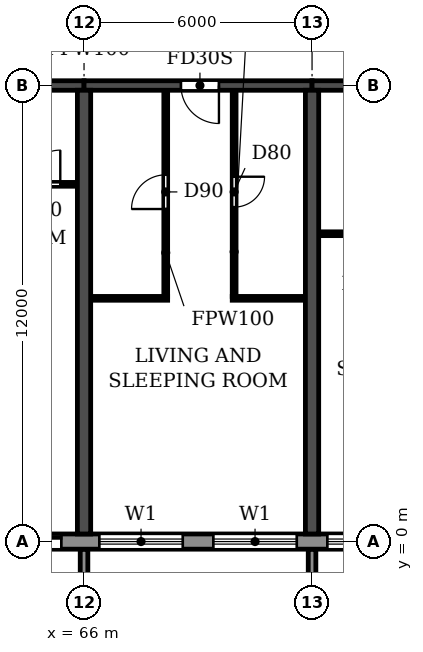
"""IFC4 building model, lengths in metres.
Left out: names, types, materials, properties, quantities, classifications, styles, units other than length and angle.
Written with IfcOpenShell. Run it as: python <this file> out.ifc"""

import sys

from ifc_helpers import new_model, si_unit, direction, frame, frame_2d, origin, place, context, subcontext, project, spatial, polyline, rectangle, outline, extrude, source, transform, mapped, element, fill, save


model = new_model("IFC4")
c1 = context("Model", 3, precision=1e-05, world=origin(), true_north=direction((0.0, 1.0)))
c2 = subcontext(c1, "Body", "Model", "MODEL_VIEW")
j1 = project(units=[si_unit("LENGTHUNIT", "METRE"), si_unit("PLANEANGLEUNIT", "RADIAN")], contexts=[c1])
p1 = place(None, origin())
s1 = spatial("IfcSite", under=j1, at=p1, CompositionType="ELEMENT")
p2 = place(p1, origin())
s2 = spatial("IfcBuilding", under=s1, at=p2, CompositionType="ELEMENT")
p3 = place(p2, frame((0.0, 0.0, 92.7)))
s3 = spatial("IfcBuildingStorey", under=s2, at=p3, CompositionType="ELEMENT", Elevation=92.7)
for number, where, z_axis, x_axis in (
    (1, (66.0, 0.2, 0.0), (0.0, 0.0, 1.0), (0.0, 1.0, 0.0)),
    (2, (72.0, 0.2, 0.0), (0.0, 0.0, 1.0), (0.0, 1.0, 0.0)),
):
    element("IfcWall", number, at=place(p3, frame(where, z_axis=z_axis, x_axis=x_axis)), inside=s3, PredefinedType="SHEAR", context=c2, shape_type="SweptSolid", body=[
        extrude(rectangle(XDim=11.675, YDim=0.35, at=frame_2d((5.837, 0.0))), origin(), (0.0, 0.0, 1.0), 3.06),
    ])
p4 = place(p3, frame((60.0, 12.0, 0.0), z_axis=(0.0, 0.0, 1.0), x_axis=(1.0, 0.0, 0.0)))
e3 = element("IfcWall", 3, at=p4, inside=s3, PredefinedType="SHEAR", context=c2, shape_type="SweptSolid", body=[
    extrude(rectangle(XDim=6.0, YDim=0.25, at=frame_2d((3.0, 0.0))), origin(), (0.0, 0.0, 1.0), 2.46),
])
p5 = place(p4, frame((2.45, 0.0, 0.0)))
e4 = element("IfcOpeningElement", 4, at=p5, cuts=e3, PredefinedType="OPENING", context=c2, shape_type="SweptSolid", body=[
    extrude(rectangle(XDim=1.0, YDim=2.1, at=frame_2d((0.5, 1.05))), frame((0.0, 0.135, 0.0), z_axis=(0.0, -1.0, 0.0), x_axis=(1.0, 0.0, 0.0)), (0.0, 0.0, 1.0), 0.27),
])
p6 = place(p3, frame((66.0, 12.0, 0.0), z_axis=(0.0, 0.0, 1.0), x_axis=(1.0, 0.0, 0.0)))
e5 = element("IfcWall", 5, at=p6, inside=s3, PredefinedType="SHEAR", context=c2, shape_type="SweptSolid", body=[
    extrude(rectangle(XDim=6.0, YDim=0.25, at=frame_2d((3.0, 0.0))), origin(), (0.0, 0.0, 1.0), 2.46),
])
p7 = place(p6, frame((2.55, 0.0, 0.0)))
e6 = element("IfcOpeningElement", 6, at=p7, cuts=e5, PredefinedType="OPENING", context=c2, shape_type="SweptSolid", body=[
    extrude(rectangle(XDim=1.0, YDim=2.1, at=frame_2d((0.5, 1.05))), frame((0.0, 0.135, 0.0), z_axis=(0.0, -1.0, 0.0), x_axis=(1.0, 0.0, 0.0)), (0.0, 0.0, 1.0), 0.27),
])
p8 = place(p3, frame((72.0, 12.0, 0.0), z_axis=(0.0, 0.0, 1.0), x_axis=(1.0, 0.0, 0.0)))
e7 = element("IfcWall", 7, at=p8, inside=s3, PredefinedType="SHEAR", context=c2, shape_type="SweptSolid", body=[
    extrude(rectangle(XDim=6.0, YDim=0.25, at=frame_2d((3.0, 0.0))), origin(), (0.0, 0.0, 1.0), 2.46),
])
p9 = place(p8, frame((2.45, 0.0, 0.0)))
e8 = element("IfcOpeningElement", 8, at=p9, cuts=e7, PredefinedType="OPENING", context=c2, shape_type="SweptSolid", body=[
    extrude(rectangle(XDim=1.0, YDim=2.1, at=frame_2d((0.5, 1.05))), frame((0.0, 0.135, 0.0), z_axis=(0.0, -1.0, 0.0), x_axis=(1.0, 0.0, 0.0)), (0.0, 0.0, 1.0), 0.27),
])
p10 = place(p3, frame((10.683, 0.0, 0.0), z_axis=(0.0, 0.0, 1.0), x_axis=(1.0, 0.0, 0.0)))
e9 = element("IfcWall", 9, at=p10, inside=s3, PredefinedType="STANDARD", context=c2, shape_type="SweptSolid", body=[
    extrude(rectangle(XDim=80.634, YDim=0.4, at=frame_2d((40.317, 0.0))), origin(), (0.0, 0.0, 1.0), 3.06),
])
p11 = place(p10, frame((1.717, 0.0, 0.9)))
e10 = element("IfcOpeningElement", 10, at=p11, cuts=e9, PredefinedType="OPENING", context=c2, shape_type="SweptSolid", body=[
    extrude(rectangle(XDim=2.2, YDim=1.5, at=frame_2d((1.1, 0.75))), frame((0.0, 0.21, 0.0), z_axis=(0.0, -1.0, 0.0), x_axis=(1.0, 0.0, 0.0)), (0.0, 0.0, 1.0), 0.42),
])
p12 = place(p10, frame((4.917, 0.0, 0.0)))
e11 = element("IfcOpeningElement", 11, at=p12, cuts=e9, PredefinedType="OPENING", context=c2, shape_type="SweptSolid", body=[
    extrude(rectangle(XDim=1.8, YDim=2.4, at=frame_2d((0.9, 1.2))), frame((0.0, 0.21, 0.0), z_axis=(0.0, -1.0, 0.0), x_axis=(1.0, 0.0, 0.0)), (0.0, 0.0, 1.0), 0.42),
])
p13 = place(p10, frame((7.717, 0.0, 0.9)))
e12 = element("IfcOpeningElement", 12, at=p13, cuts=e9, PredefinedType="OPENING", context=c2, shape_type="SweptSolid", body=[
    extrude(rectangle(XDim=2.2, YDim=1.5, at=frame_2d((1.1, 0.75))), frame((0.0, 0.21, 0.0), z_axis=(0.0, -1.0, 0.0), x_axis=(1.0, 0.0, 0.0)), (0.0, 0.0, 1.0), 0.42),
])
p14 = place(p10, frame((10.717, 0.0, 0.9)))
e13 = element("IfcOpeningElement", 13, at=p14, cuts=e9, PredefinedType="OPENING", context=c2, shape_type="SweptSolid", body=[
    extrude(rectangle(XDim=2.2, YDim=1.5, at=frame_2d((1.1, 0.75))), frame((0.0, 0.21, 0.0), z_axis=(0.0, -1.0, 0.0), x_axis=(1.0, 0.0, 0.0)), (0.0, 0.0, 1.0), 0.42),
])
p15 = place(p10, frame((13.717, 0.0, 0.9)))
e14 = element("IfcOpeningElement", 14, at=p15, cuts=e9, PredefinedType="OPENING", context=c2, shape_type="SweptSolid", body=[
    extrude(rectangle(XDim=2.2, YDim=1.5, at=frame_2d((1.1, 0.75))), frame((0.0, 0.21, 0.0), z_axis=(0.0, -1.0, 0.0), x_axis=(1.0, 0.0, 0.0)), (0.0, 0.0, 1.0), 0.42),
])
p16 = place(p10, frame((16.717, 0.0, 0.9)))
e15 = element("IfcOpeningElement", 15, at=p16, cuts=e9, PredefinedType="OPENING", context=c2, shape_type="SweptSolid", body=[
    extrude(rectangle(XDim=2.2, YDim=1.5, at=frame_2d((1.1, 0.75))), frame((0.0, 0.21, 0.0), z_axis=(0.0, -1.0, 0.0), x_axis=(1.0, 0.0, 0.0)), (0.0, 0.0, 1.0), 0.42),
])
p17 = place(p10, frame((19.717, 0.0, 0.9)))
e16 = element("IfcOpeningElement", 16, at=p17, cuts=e9, PredefinedType="OPENING", context=c2, shape_type="SweptSolid", body=[
    extrude(rectangle(XDim=2.2, YDim=1.5, at=frame_2d((1.1, 0.75))), frame((0.0, 0.21, 0.0), z_axis=(0.0, -1.0, 0.0), x_axis=(1.0, 0.0, 0.0)), (0.0, 0.0, 1.0), 0.42),
])
p18 = place(p10, frame((22.717, 0.0, 0.9)))
e17 = element("IfcOpeningElement", 17, at=p18, cuts=e9, PredefinedType="OPENING", context=c2, shape_type="SweptSolid", body=[
    extrude(rectangle(XDim=2.2, YDim=1.5, at=frame_2d((1.1, 0.75))), frame((0.0, 0.21, 0.0), z_axis=(0.0, -1.0, 0.0), x_axis=(1.0, 0.0, 0.0)), (0.0, 0.0, 1.0), 0.42),
])
p19 = place(p10, frame((25.717, 0.0, 0.9)))
e18 = element("IfcOpeningElement", 18, at=p19, cuts=e9, PredefinedType="OPENING", context=c2, shape_type="SweptSolid", body=[
    extrude(rectangle(XDim=2.2, YDim=1.5, at=frame_2d((1.1, 0.75))), frame((0.0, 0.21, 0.0), z_axis=(0.0, -1.0, 0.0), x_axis=(1.0, 0.0, 0.0)), (0.0, 0.0, 1.0), 0.42),
])
p20 = place(p10, frame((28.917, 0.0, 0.0)))
e19 = element("IfcOpeningElement", 19, at=p20, cuts=e9, PredefinedType="OPENING", context=c2, shape_type="SweptSolid", body=[
    extrude(rectangle(XDim=1.8, YDim=2.4, at=frame_2d((0.9, 1.2))), frame((0.0, 0.21, 0.0), z_axis=(0.0, -1.0, 0.0), x_axis=(1.0, 0.0, 0.0)), (0.0, 0.0, 1.0), 0.42),
])
p21 = place(p10, frame((31.717, 0.0, 0.9)))
e20 = element("IfcOpeningElement", 20, at=p21, cuts=e9, PredefinedType="OPENING", context=c2, shape_type="SweptSolid", body=[
    extrude(rectangle(XDim=2.2, YDim=1.5, at=frame_2d((1.1, 0.75))), frame((0.0, 0.21, 0.0), z_axis=(0.0, -1.0, 0.0), x_axis=(1.0, 0.0, 0.0)), (0.0, 0.0, 1.0), 0.42),
])
p22 = place(p10, frame((34.717, 0.0, 0.9)))
e21 = element("IfcOpeningElement", 21, at=p22, cuts=e9, PredefinedType="OPENING", context=c2, shape_type="SweptSolid", body=[
    extrude(rectangle(XDim=2.2, YDim=1.5, at=frame_2d((1.1, 0.75))), frame((0.0, 0.21, 0.0), z_axis=(0.0, -1.0, 0.0), x_axis=(1.0, 0.0, 0.0)), (0.0, 0.0, 1.0), 0.42),
])
p23 = place(p10, frame((37.917, 0.0, 0.0)))
e22 = element("IfcOpeningElement", 22, at=p23, cuts=e9, PredefinedType="OPENING", context=c2, shape_type="SweptSolid", body=[
    extrude(rectangle(XDim=1.8, YDim=2.4, at=frame_2d((0.9, 1.2))), frame((0.0, 0.21, 0.0), z_axis=(0.0, -1.0, 0.0), x_axis=(1.0, 0.0, 0.0)), (0.0, 0.0, 1.0), 0.42),
])
p24 = place(p10, frame((40.717, 0.0, 0.9)))
e23 = element("IfcOpeningElement", 23, at=p24, cuts=e9, PredefinedType="OPENING", context=c2, shape_type="SweptSolid", body=[
    extrude(rectangle(XDim=2.2, YDim=1.5, at=frame_2d((1.1, 0.75))), frame((0.0, 0.21, 0.0), z_axis=(0.0, -1.0, 0.0), x_axis=(1.0, 0.0, 0.0)), (0.0, 0.0, 1.0), 0.42),
])
p25 = place(p10, frame((43.717, 0.0, 0.9)))
e24 = element("IfcOpeningElement", 24, at=p25, cuts=e9, PredefinedType="OPENING", context=c2, shape_type="SweptSolid", body=[
    extrude(rectangle(XDim=2.2, YDim=1.5, at=frame_2d((1.1, 0.75))), frame((0.0, 0.21, 0.0), z_axis=(0.0, -1.0, 0.0), x_axis=(1.0, 0.0, 0.0)), (0.0, 0.0, 1.0), 0.42),
])
p26 = place(p10, frame((46.717, 0.0, 0.9)))
e25 = element("IfcOpeningElement", 25, at=p26, cuts=e9, PredefinedType="OPENING", context=c2, shape_type="SweptSolid", body=[
    extrude(rectangle(XDim=2.2, YDim=1.5, at=frame_2d((1.1, 0.75))), frame((0.0, 0.21, 0.0), z_axis=(0.0, -1.0, 0.0), x_axis=(1.0, 0.0, 0.0)), (0.0, 0.0, 1.0), 0.42),
])
p27 = place(p10, frame((49.717, 0.0, 0.9)))
e26 = element("IfcOpeningElement", 26, at=p27, cuts=e9, PredefinedType="OPENING", context=c2, shape_type="SweptSolid", body=[
    extrude(rectangle(XDim=2.2, YDim=1.5, at=frame_2d((1.1, 0.75))), frame((0.0, 0.21, 0.0), z_axis=(0.0, -1.0, 0.0), x_axis=(1.0, 0.0, 0.0)), (0.0, 0.0, 1.0), 0.42),
])
p28 = place(p10, frame((52.917, 0.0, 0.0)))
e27 = element("IfcOpeningElement", 27, at=p28, cuts=e9, PredefinedType="OPENING", context=c2, shape_type="SweptSolid", body=[
    extrude(rectangle(XDim=1.8, YDim=2.4, at=frame_2d((0.9, 1.2))), frame((0.0, 0.21, 0.0), z_axis=(0.0, -1.0, 0.0), x_axis=(1.0, 0.0, 0.0)), (0.0, 0.0, 1.0), 0.42),
])
p29 = place(p10, frame((55.717, 0.0, 0.9)))
e28 = element("IfcOpeningElement", 28, at=p29, cuts=e9, PredefinedType="OPENING", context=c2, shape_type="SweptSolid", body=[
    extrude(rectangle(XDim=2.2, YDim=1.5, at=frame_2d((1.1, 0.75))), frame((0.0, 0.21, 0.0), z_axis=(0.0, -1.0, 0.0), x_axis=(1.0, 0.0, 0.0)), (0.0, 0.0, 1.0), 0.42),
])
p30 = place(p10, frame((58.717, 0.0, 0.9)))
e29 = element("IfcOpeningElement", 29, at=p30, cuts=e9, PredefinedType="OPENING", context=c2, shape_type="SweptSolid", body=[
    extrude(rectangle(XDim=2.2, YDim=1.5, at=frame_2d((1.1, 0.75))), frame((0.0, 0.21, 0.0), z_axis=(0.0, -1.0, 0.0), x_axis=(1.0, 0.0, 0.0)), (0.0, 0.0, 1.0), 0.42),
])
p31 = place(p10, frame((61.717, 0.0, 0.9)))
e30 = element("IfcOpeningElement", 30, at=p31, cuts=e9, PredefinedType="OPENING", context=c2, shape_type="SweptSolid", body=[
    extrude(rectangle(XDim=2.2, YDim=1.5, at=frame_2d((1.1, 0.75))), frame((0.0, 0.21, 0.0), z_axis=(0.0, -1.0, 0.0), x_axis=(1.0, 0.0, 0.0)), (0.0, 0.0, 1.0), 0.42),
])
p32 = place(p10, frame((64.917, 0.0, 0.0)))
e31 = element("IfcOpeningElement", 31, at=p32, cuts=e9, PredefinedType="OPENING", context=c2, shape_type="SweptSolid", body=[
    extrude(rectangle(XDim=1.8, YDim=2.4, at=frame_2d((0.9, 1.2))), frame((0.0, 0.21, 0.0), z_axis=(0.0, -1.0, 0.0), x_axis=(1.0, 0.0, 0.0)), (0.0, 0.0, 1.0), 0.42),
])
p33 = place(p10, frame((67.717, 0.0, 0.9)))
e32 = element("IfcOpeningElement", 32, at=p33, cuts=e9, PredefinedType="OPENING", context=c2, shape_type="SweptSolid", body=[
    extrude(rectangle(XDim=2.2, YDim=1.5, at=frame_2d((1.1, 0.75))), frame((0.0, 0.21, 0.0), z_axis=(0.0, -1.0, 0.0), x_axis=(1.0, 0.0, 0.0)), (0.0, 0.0, 1.0), 0.42),
])
p34 = place(p10, frame((70.717, 0.0, 0.9)))
e33 = element("IfcOpeningElement", 33, at=p34, cuts=e9, PredefinedType="OPENING", context=c2, shape_type="SweptSolid", body=[
    extrude(rectangle(XDim=2.2, YDim=1.5, at=frame_2d((1.1, 0.75))), frame((0.0, 0.21, 0.0), z_axis=(0.0, -1.0, 0.0), x_axis=(1.0, 0.0, 0.0)), (0.0, 0.0, 1.0), 0.42),
])
p35 = place(p10, frame((73.917, 0.0, 0.0)))
e34 = element("IfcOpeningElement", 34, at=p35, cuts=e9, PredefinedType="OPENING", context=c2, shape_type="SweptSolid", body=[
    extrude(rectangle(XDim=1.8, YDim=2.4, at=frame_2d((0.9, 1.2))), frame((0.0, 0.21, 0.0), z_axis=(0.0, -1.0, 0.0), x_axis=(1.0, 0.0, 0.0)), (0.0, 0.0, 1.0), 0.42),
])
p36 = place(p10, frame((76.717, 0.0, 0.9)))
e35 = element("IfcOpeningElement", 35, at=p36, cuts=e9, PredefinedType="OPENING", context=c2, shape_type="SweptSolid", body=[
    extrude(rectangle(XDim=2.2, YDim=1.5, at=frame_2d((1.1, 0.75))), frame((0.0, 0.21, 0.0), z_axis=(0.0, -1.0, 0.0), x_axis=(1.0, 0.0, 0.0)), (0.0, 0.0, 1.0), 0.42),
])
m1 = source(origin(), c2, "Body", "SweptSolid", [
    extrude(outline(polyline([(0.0, 0.0), (0.2, 0.0), (0.2, 1.65), (0.0, 1.65), (0.0, 0.0)])), origin(), (0.0, 0.0, 1.0), 3.1),
])
for number, where in (
    (36, (65.9, -1.85, 0.0)),
    (37, (71.9, -1.85, 0.0)),
):
    element("IfcWall", number, at=place(p3, frame(where)), inside=s3, PredefinedType="STANDARD", context=c2, shape_type="MappedRepresentation", body=[
        mapped(m1, transform((0.0, 0.0, 0.0))),
    ])
p37 = place(p3, frame((66.185, 6.4, 0.0), z_axis=(0.0, 0.0, 1.0), x_axis=(1.0, 0.0, 0.0)))
e38 = element("IfcWall", 38, at=p37, inside=s3, PredefinedType="PARTITIONING", context=c2, shape_type="SweptSolid", body=[
    extrude(rectangle(XDim=2.015, YDim=0.1, at=frame_2d((1.007, 0.0))), origin(), (0.0, 0.0, 1.0), 3.06),
])
for number, where, z_axis, x_axis in (
    (39, (69.9, 6.4, 0.0), (0.0, 0.0, 1.0), (1.0, 0.0, 0.0)),
    (40, (72.185, 8.1, 0.0), (0.0, 0.0, 1.0), (1.0, 0.0, 0.0)),
):
    element("IfcWall", number, at=place(p3, frame(where, z_axis=z_axis, x_axis=x_axis)), inside=s3, PredefinedType="PARTITIONING", context=c2, shape_type="SweptSolid", body=[
        extrude(rectangle(XDim=1.915, YDim=0.1, at=frame_2d((0.958, 0.0))), origin(), (0.0, 0.0, 1.0), 3.06),
    ])
p38 = place(p3, frame((63.8, 9.4, 0.0), z_axis=(0.0, 0.0, 1.0), x_axis=(1.0, 0.0, 0.0)))
e41 = element("IfcWall", 41, at=p38, inside=s3, PredefinedType="PARTITIONING", context=c2, shape_type="SweptSolid", body=[
    extrude(rectangle(XDim=2.015, YDim=0.1, at=frame_2d((1.007, 0.0))), origin(), (0.0, 0.0, 1.0), 3.06),
])
p39 = place(p38, frame((0.675, 0.0, 0.0)))
e42 = element("IfcOpeningElement", 42, at=p39, cuts=e41, PredefinedType="OPENING", context=c2, shape_type="SweptSolid", body=[
    extrude(rectangle(XDim=0.9, YDim=2.1, at=frame_2d((0.45, 1.05))), frame((0.0, 0.06, 0.0), z_axis=(0.0, -1.0, 0.0), x_axis=(1.0, 0.0, 0.0)), (0.0, 0.0, 1.0), 0.12),
])
p40 = place(p3, frame((68.15, 6.45, 0.0), z_axis=(0.0, 0.0, 1.0), x_axis=(0.0, 1.0, 0.0)))
e43 = element("IfcWall", 43, at=p40, inside=s3, PredefinedType="PARTITIONING", context=c2, shape_type="SweptSolid", body=[
    extrude(rectangle(XDim=5.415, YDim=0.1, at=frame_2d((2.708, 0.0))), origin(), (0.0, 0.0, 1.0), 3.06),
])
p41 = place(p40, frame((2.3, 0.0, 0.0)))
e44 = element("IfcOpeningElement", 44, at=p41, cuts=e43, PredefinedType="OPENING", context=c2, shape_type="SweptSolid", body=[
    extrude(rectangle(XDim=0.9, YDim=2.1, at=frame_2d((0.45, 1.05))), frame((0.0, 0.06, 0.0), z_axis=(0.0, -1.0, 0.0), x_axis=(1.0, 0.0, 0.0)), (0.0, 0.0, 1.0), 0.12),
])
p42 = place(p3, frame((69.95, 6.45, 0.0), z_axis=(0.0, 0.0, 1.0), x_axis=(0.0, 1.0, 0.0)))
e45 = element("IfcWall", 45, at=p42, inside=s3, PredefinedType="PARTITIONING", context=c2, shape_type="SweptSolid", body=[
    extrude(rectangle(XDim=5.415, YDim=0.1, at=frame_2d((2.708, 0.0))), origin(), (0.0, 0.0, 1.0), 3.06),
])
p43 = place(p42, frame((2.35, 0.0, 0.0)))
e46 = element("IfcOpeningElement", 46, at=p43, cuts=e45, PredefinedType="OPENING", context=c2, shape_type="SweptSolid", body=[
    extrude(rectangle(XDim=0.8, YDim=2.1, at=frame_2d((0.4, 1.05))), frame((0.0, 0.06, 0.0), z_axis=(0.0, -1.0, 0.0), x_axis=(1.0, 0.0, 0.0)), (0.0, 0.0, 1.0), 0.12),
])
p44 = place(p28, origin())
e47 = element("IfcDoor", 47, at=p44, inside=s3, OperationType="DOUBLE_DOOR_SLIDING", PredefinedType="DOOR", context=c2, shape_type="SweptSolid", body=[
    extrude(rectangle(XDim=1.8, YDim=2.4, at=frame_2d((0.9, 1.2))), frame((0.0, 0.025, 0.0), z_axis=(0.0, -1.0, 0.0), x_axis=(1.0, 0.0, 0.0)), (0.0, 0.0, 1.0), 0.05),
])
fill(e27, e47)
p45 = place(p29, origin())
e48 = element("IfcWindow", 48, at=p45, inside=s3, PartitioningType="DOUBLE_PANEL_HORIZONTAL", PredefinedType="WINDOW", context=c2, shape_type="SweptSolid", body=[
    extrude(rectangle(XDim=2.2, YDim=1.5, at=frame_2d((1.1, 0.75))), frame((0.0, 0.03, 0.0), z_axis=(0.0, -1.0, 0.0), x_axis=(1.0, 0.0, 0.0)), (0.0, 0.0, 1.0), 0.06),
])
fill(e28, e48)
p46 = place(p30, origin())
e49 = element("IfcWindow", 49, at=p46, inside=s3, PartitioningType="DOUBLE_PANEL_HORIZONTAL", PredefinedType="WINDOW", context=c2, shape_type="SweptSolid", body=[
    extrude(rectangle(XDim=2.2, YDim=1.5, at=frame_2d((1.1, 0.75))), frame((0.0, 0.03, 0.0), z_axis=(0.0, -1.0, 0.0), x_axis=(1.0, 0.0, 0.0)), (0.0, 0.0, 1.0), 0.06),
])
fill(e29, e49)
p47 = place(p31, origin())
e50 = element("IfcWindow", 50, at=p47, inside=s3, PartitioningType="DOUBLE_PANEL_HORIZONTAL", PredefinedType="WINDOW", context=c2, shape_type="SweptSolid", body=[
    extrude(rectangle(XDim=2.2, YDim=1.5, at=frame_2d((1.1, 0.75))), frame((0.0, 0.03, 0.0), z_axis=(0.0, -1.0, 0.0), x_axis=(1.0, 0.0, 0.0)), (0.0, 0.0, 1.0), 0.06),
])
fill(e30, e50)
p48 = place(p39, origin())
e51 = element("IfcDoor", 51, at=p48, inside=s3, OperationType="SINGLE_SWING_RIGHT", PredefinedType="DOOR", context=c2, shape_type="SweptSolid", body=[
    extrude(rectangle(XDim=0.9, YDim=2.1, at=frame_2d((0.45, 1.05))), frame((0.0, 0.025, 0.0), z_axis=(0.0, -1.0, 0.0), x_axis=(1.0, 0.0, 0.0)), (0.0, 0.0, 1.0), 0.05),
])
fill(e42, e51)
p49 = place(p41, origin())
e52 = element("IfcDoor", 52, at=p49, inside=s3, OperationType="SINGLE_SWING_LEFT", PredefinedType="DOOR", context=c2, shape_type="SweptSolid", body=[
    extrude(rectangle(XDim=0.9, YDim=2.1, at=frame_2d((0.45, 1.05))), frame((0.0, 0.025, 0.0), z_axis=(0.0, -1.0, 0.0), x_axis=(1.0, 0.0, 0.0)), (0.0, 0.0, 1.0), 0.05),
])
fill(e44, e52)
p50 = place(p7, frame((1.0, 0.0, 0.0), z_axis=(0.0, 0.0, 1.0), x_axis=(-1.0, 0.0, 0.0)))
e53 = element("IfcDoor", 53, at=p50, inside=s3, OperationType="SINGLE_SWING_LEFT", PredefinedType="DOOR", context=c2, shape_type="SweptSolid", body=[
    extrude(rectangle(XDim=1.0, YDim=2.1, at=frame_2d((0.5, 1.05))), frame((0.0, 0.025, 0.0), z_axis=(0.0, -1.0, 0.0), x_axis=(1.0, 0.0, 0.0)), (0.0, 0.0, 1.0), 0.05),
])
fill(e6, e53)
p51 = place(p43, frame((0.8, 0.0, 0.0), z_axis=(0.0, 0.0, 1.0), x_axis=(-1.0, 0.0, 0.0)))
e54 = element("IfcDoor", 54, at=p51, inside=s3, OperationType="SINGLE_SWING_LEFT", PredefinedType="DOOR", context=c2, shape_type="SweptSolid", body=[
    extrude(rectangle(XDim=0.8, YDim=2.1, at=frame_2d((0.4, 1.05))), frame((0.0, 0.025, 0.0), z_axis=(0.0, -1.0, 0.0), x_axis=(1.0, 0.0, 0.0)), (0.0, 0.0, 1.0), 0.05),
])
fill(e46, e54)
save(model, sys.argv[1])
